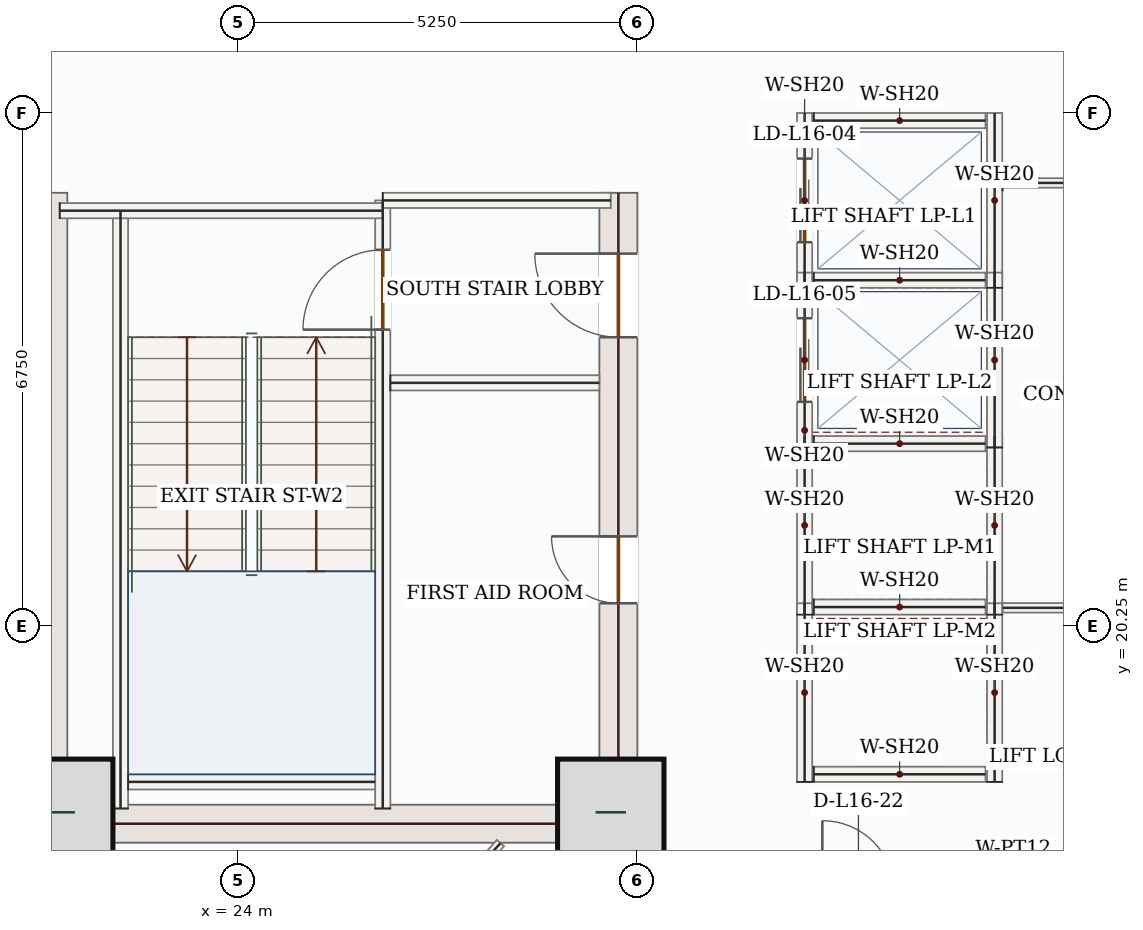
"""IFC4 building model, lengths in metres.
Left out: names, types, materials, properties, quantities, classifications, styles, units other than length and angle.
Written with IfcOpenShell. Run it as: python <this file> out.ifc"""

import sys

from ifc_helpers import new_model, si_unit, direction, frame, frame_2d, origin, origin_2d, place, context, subcontext, project, spatial, rectangle, extrude, source, transform, mapped, element, fill, save


model = new_model("IFC4")
c1 = context("Model", 3, precision=1e-05, world=origin(), true_north=direction((0.0, 1.0)))
c2 = subcontext(c1, "Body", "Model", "MODEL_VIEW")
j1 = project(units=[si_unit("LENGTHUNIT", "METRE"), si_unit("PLANEANGLEUNIT", "RADIAN")], contexts=[c1])
p1 = place(None, origin())
s1 = spatial("IfcSite", under=j1, at=p1, CompositionType="ELEMENT")
p2 = place(p1, origin())
s2 = spatial("IfcBuilding", under=s1, at=p2, CompositionType="ELEMENT")
p3 = place(p2, frame((0.0, 0.0, 75.3)))
s3 = spatial("IfcBuildingStorey", under=s2, at=p3, CompositionType="ELEMENT", Elevation=75.3)
m1 = source(origin(), c2, "Body", "SweptSolid", [
    extrude(rectangle(XDim=8.55, YDim=0.5, at=frame_2d((4.275, 0.0))), origin(), (0.0, 0.0, 1.0), 3.95),
])
p4 = place(p3, frame((21.5, 17.4, 0.0), z_axis=(0.0, 0.0, 1.0), x_axis=(0.0, 1.0, 0.0)))
e1 = element("IfcWall", 1, at=p4, inside=s3, PredefinedType="SHEAR", context=c2, shape_type="MappedRepresentation", body=[
    mapped(m1, transform((0.0, 0.0, 0.0), x_axis=(1.0, 0.0, 0.0), y_axis=(0.0, 1.0, 0.0), z_axis=(0.0, 0.0, 1.0), scale=1.0)),
])
p5 = place(p3, frame((29.0, 17.4, 0.0), z_axis=(0.0, 0.0, 1.0), x_axis=(0.0, 1.0, 0.0)))
e2 = element("IfcWall", 2, at=p5, inside=s3, PredefinedType="SHEAR", context=c2, shape_type="SweptSolid", body=[
    extrude(rectangle(XDim=8.55, YDim=0.5, at=frame_2d((4.275, 0.0))), origin(), (0.0, 0.0, 1.0), 3.95),
])
p6 = place(p5, frame((6.65, 0.0, 0.0)))
e3 = element("IfcOpeningElement", 3, at=p6, cuts=e2, PredefinedType="OPENING", context=c2, shape_type="SweptSolid", body=[
    extrude(rectangle(XDim=1.1, YDim=2.2, at=frame_2d((0.55, 1.1))), frame((0.0, 0.26, 0.0), z_axis=(0.0, -1.0, 0.0), x_axis=(1.0, 0.0, 0.0)), (0.0, 0.0, 1.0), 0.52),
])
p7 = place(p5, frame((3.15, 0.0, 0.0)))
e4 = element("IfcOpeningElement", 4, at=p7, cuts=e2, PredefinedType="OPENING", context=c2, shape_type="SweptSolid", body=[
    extrude(rectangle(XDim=0.88, YDim=2.1, at=frame_2d((0.44, 1.05))), frame((0.0, 0.26, 0.0), z_axis=(0.0, -1.0, 0.0), x_axis=(1.0, 0.0, 0.0)), (0.0, 0.0, 1.0), 0.52),
])
m2 = source(origin(), c2, "Body", "SweptSolid", [
    extrude(rectangle(XDim=7.0, YDim=0.5, at=frame_2d((3.5, 0.0))), origin(), (0.0, 0.0, 1.0), 3.95),
])
p8 = place(p3, frame((21.75, 17.65, 0.0), z_axis=(0.0, 0.0, 1.0), x_axis=(1.0, 0.0, 0.0)))
e5 = element("IfcWall", 5, at=p8, inside=s3, PredefinedType="SHEAR", context=c2, shape_type="MappedRepresentation", body=[
    mapped(m2, transform((0.0, 0.0, 0.0), x_axis=(1.0, 0.0, 0.0), y_axis=(0.0, 1.0, 0.0), z_axis=(0.0, 0.0, 1.0), scale=1.0)),
])
m3 = source(origin(), c2, "Body", "SweptSolid", [
    extrude(rectangle(XDim=1.4, YDim=1.4, at=origin_2d()), origin(), (0.0, 0.0, 1.0), 4.2),
])
for number, where, z_axis, x_axis in (
    (6, (21.65, 17.8, 0.0), (0.0, 0.0, 1.0), (1.0, 0.0, 0.0)),
    (7, (28.9, 17.8, 0.0), (0.0, 0.0, 1.0), (1.0, 0.0, 0.0)),
):
    element("IfcColumn", number, at=place(p3, frame(where, z_axis=z_axis, x_axis=x_axis)), inside=s3, PredefinedType="COLUMN", context=c2, shape_type="MappedRepresentation", body=[
        mapped(m3, transform((0.0, 0.0, 0.0), x_axis=(1.0, 0.0, 0.0), y_axis=(0.0, 1.0, 0.0), z_axis=(0.0, 0.0, 1.0), scale=1.0)),
    ])
p9 = place(p3, frame((22.658, 14.74, 0.0), z_axis=(0.0, 0.0, 1.0), x_axis=(-0.707106781187, 0.707106781187, 0.0)))
e8 = element("IfcWall", 8, at=p9, inside=s3, PredefinedType="SOLIDWALL", context=c2, shape_type="SweptSolid", body=[
    extrude(rectangle(XDim=5.258, YDim=0.32, at=frame_2d((2.629, 0.0))), origin(), (0.0, 0.0, 1.0), 3.95),
])
p10 = place(p9, frame((1.429, 0.0, 0.85)))
e9 = element("IfcOpeningElement", 9, at=p10, cuts=e8, PredefinedType="OPENING", context=c2, shape_type="SweptSolid", body=[
    extrude(rectangle(XDim=2.4, YDim=1.8, at=frame_2d((1.2, 0.9))), frame((0.0, 0.17, 0.0), z_axis=(0.0, -1.0, 0.0), x_axis=(1.0, 0.0, 0.0)), (0.0, 0.0, 1.0), 0.34),
])
m4 = source(origin(), c2, "Body", "SweptSolid", [
    extrude(rectangle(XDim=7.87, YDim=0.2, at=frame_2d((3.935, 0.0))), origin(), (0.0, 0.0, 1.0), 3.95),
])
p11 = place(p3, frame((22.45, 17.85, 0.0), z_axis=(0.0, 0.0, 1.0), x_axis=(0.0, 1.0, 0.0)))
e10 = element("IfcWall", 10, at=p11, inside=s3, PredefinedType="SOLIDWALL", context=c2, shape_type="MappedRepresentation", body=[
    mapped(m4, transform((0.0, 0.0, 0.0), x_axis=(1.0, 0.0, 0.0), y_axis=(0.0, 1.0, 0.0), z_axis=(0.0, 0.0, 1.0), scale=1.0)),
])
p12 = place(p3, frame((25.9, 17.85, 0.0), z_axis=(0.0, 0.0, 1.0), x_axis=(0.0, 1.0, 0.0)))
e11 = element("IfcWall", 11, at=p12, inside=s3, PredefinedType="SOLIDWALL", context=c2, shape_type="SweptSolid", body=[
    extrude(rectangle(XDim=8.0, YDim=0.2, at=frame_2d((4.0, 0.0))), origin(), (0.0, 0.0, 1.0), 3.95),
])
p13 = place(p12, frame((6.3, 0.0, 0.0)))
e12 = element("IfcOpeningElement", 12, at=p13, cuts=e11, PredefinedType="OPENING", context=c2, shape_type="SweptSolid", body=[
    extrude(rectangle(XDim=1.05, YDim=2.15, at=frame_2d((0.525, 1.075))), frame((0.0, 0.11, 0.0), z_axis=(0.0, -1.0, 0.0), x_axis=(1.0, 0.0, 0.0)), (0.0, 0.0, 1.0), 0.22),
])
m5 = source(origin(), c2, "Body", "SweptSolid", [
    extrude(rectangle(XDim=4.25, YDim=0.2, at=frame_2d((2.125, 0.0))), origin(), (0.0, 0.0, 1.0), 3.95),
])
p14 = place(p3, frame((21.65, 25.715, 0.0), z_axis=(0.0, 0.0, 1.0), x_axis=(1.0, 0.0, 0.0)))
e13 = element("IfcWall", 13, at=p14, inside=s3, PredefinedType="SOLIDWALL", context=c2, shape_type="MappedRepresentation", body=[
    mapped(m5, transform((0.0, 0.0, 0.0), x_axis=(1.0, 0.0, 0.0), y_axis=(0.0, 1.0, 0.0), z_axis=(0.0, 0.0, 1.0), scale=1.0)),
])
m6 = source(origin(), c2, "Body", "SweptSolid", [
    extrude(rectangle(XDim=3.0, YDim=0.2, at=frame_2d((1.5, 0.0))), origin(), (0.0, 0.0, 1.0), 3.95),
])
p15 = place(p3, frame((25.9, 25.85, 0.0), z_axis=(0.0, 0.0, 1.0), x_axis=(1.0, 0.0, 0.0)))
e14 = element("IfcWall", 14, at=p15, inside=s3, PredefinedType="SOLIDWALL", context=c2, shape_type="MappedRepresentation", body=[
    mapped(m6, transform((0.0, 0.0, 0.0), x_axis=(1.0, 0.0, 0.0), y_axis=(0.0, 1.0, 0.0), z_axis=(0.0, 0.0, 1.0), scale=1.0)),
])
m7 = source(origin(), c2, "Body", "SweptSolid", [
    extrude(rectangle(XDim=3.25, YDim=0.2, at=frame_2d((1.625, 0.0))), origin(), (0.0, 0.0, 1.0), 3.95),
])
p16 = place(p3, frame((22.55, 18.2, 0.0), z_axis=(0.0, 0.0, 1.0), x_axis=(1.0, 0.0, 0.0)))
e15 = element("IfcWall", 15, at=p16, inside=s3, PredefinedType="SOLIDWALL", context=c2, shape_type="MappedRepresentation", body=[
    mapped(m7, transform((0.0, 0.0, 0.0), x_axis=(1.0, 0.0, 0.0), y_axis=(0.0, 1.0, 0.0), z_axis=(0.0, 0.0, 1.0), scale=1.0)),
])
m8 = source(origin(), c2, "Body", "SweptSolid", [
    extrude(rectangle(XDim=2.75, YDim=0.2, at=frame_2d((1.375, 0.0))), origin(), (0.0, 0.0, 1.0), 3.95),
])
p17 = place(p3, frame((26.0, 23.45, 0.0), z_axis=(0.0, 0.0, 1.0), x_axis=(1.0, 0.0, 0.0)))
e16 = element("IfcWall", 16, at=p17, inside=s3, PredefinedType="SOLIDWALL", context=c2, shape_type="MappedRepresentation", body=[
    mapped(m8, transform((0.0, 0.0, 0.0), x_axis=(1.0, 0.0, 0.0), y_axis=(0.0, 1.0, 0.0), z_axis=(0.0, 0.0, 1.0), scale=1.0)),
])
m9 = source(origin(), c2, "Body", "SweptSolid", [
    extrude(rectangle(XDim=2.35, YDim=0.2, at=frame_2d((1.175, 0.0))), origin(), (0.0, 0.0, 1.0), 3.95),
])
for number, where, z_axis, x_axis in (
    (17, (31.45, 20.4, 0.0), (0.0, 0.0, 1.0), (0.0, 1.0, 0.0)),
    (18, (33.95, 20.4, 0.0), (0.0, 0.0, 1.0), (0.0, 1.0, 0.0)),
):
    element("IfcWall", number, at=place(p3, frame(where, z_axis=z_axis, x_axis=x_axis)), inside=s3, PredefinedType="SOLIDWALL", context=c2, shape_type="MappedRepresentation", body=[
        mapped(m9, transform((0.0, 0.0, 0.0), x_axis=(1.0, 0.0, 0.0), y_axis=(0.0, 1.0, 0.0), z_axis=(0.0, 0.0, 1.0), scale=1.0)),
    ])
m10 = source(origin(), c2, "Body", "SweptSolid", [
    extrude(rectangle(XDim=2.26, YDim=0.2, at=frame_2d((1.13, 0.0))), origin(), (0.0, 0.0, 1.0), 3.95),
])
for number, where, z_axis, x_axis in (
    (19, (31.57, 20.5, 0.0), (0.0, 0.0, 1.0), (1.0, 0.0, 0.0)),
    (20, (31.57, 22.65, 0.0), (0.0, 0.0, 1.0), (1.0, 0.0, 0.0)),
):
    element("IfcWall", number, at=place(p3, frame(where, z_axis=z_axis, x_axis=x_axis)), inside=s3, PredefinedType="SOLIDWALL", context=c2, shape_type="MappedRepresentation", body=[
        mapped(m10, transform((0.0, 0.0, 0.0), x_axis=(1.0, 0.0, 0.0), y_axis=(0.0, 1.0, 0.0), z_axis=(0.0, 0.0, 1.0), scale=1.0)),
    ])
for number, where, z_axis, x_axis in (
    (21, (31.45, 18.2, 0.0), (0.0, 0.0, 1.0), (0.0, 1.0, 0.0)),
    (22, (33.95, 18.2, 0.0), (0.0, 0.0, 1.0), (0.0, 1.0, 0.0)),
):
    element("IfcWall", number, at=place(p3, frame(where, z_axis=z_axis, x_axis=x_axis)), inside=s3, PredefinedType="SOLIDWALL", context=c2, shape_type="MappedRepresentation", body=[
        mapped(m9, transform((0.0, 0.0, 0.0), x_axis=(1.0, 0.0, 0.0), y_axis=(0.0, 1.0, 0.0), z_axis=(0.0, 0.0, 1.0), scale=1.0)),
    ])
p18 = place(p3, frame((31.57, 18.3, 0.0), z_axis=(0.0, 0.0, 1.0), x_axis=(1.0, 0.0, 0.0)))
e23 = element("IfcWall", 23, at=p18, inside=s3, PredefinedType="SOLIDWALL", context=c2, shape_type="MappedRepresentation", body=[
    mapped(m10, transform((0.0, 0.0, 0.0), x_axis=(1.0, 0.0, 0.0), y_axis=(0.0, 1.0, 0.0), z_axis=(0.0, 0.0, 1.0), scale=1.0)),
])
p19 = place(p3, frame((31.45, 24.7, 0.0), z_axis=(0.0, 0.0, 1.0), x_axis=(0.0, 1.0, 0.0)))
e24 = element("IfcWall", 24, at=p19, inside=s3, PredefinedType="SOLIDWALL", context=c2, shape_type="SweptSolid", body=[
    extrude(rectangle(XDim=2.3, YDim=0.2, at=frame_2d((1.15, 0.0))), origin(), (0.0, 0.0, 1.0), 3.95),
])
p20 = place(p19, frame((0.6, 0.0, 0.0)))
e25 = element("IfcOpeningElement", 25, at=p20, cuts=e24, PredefinedType="OPENING", context=c2, shape_type="SweptSolid", body=[
    extrude(rectangle(XDim=1.1, YDim=2.15, at=frame_2d((0.55, 1.075))), frame((0.0, 0.11, 0.0), z_axis=(0.0, -1.0, 0.0), x_axis=(1.0, 0.0, 0.0)), (0.0, 0.0, 1.0), 0.22),
])
m11 = source(origin(), c2, "Body", "SweptSolid", [
    extrude(rectangle(XDim=2.3, YDim=0.2, at=frame_2d((1.15, 0.0))), origin(), (0.0, 0.0, 1.0), 3.95),
])
p21 = place(p3, frame((33.95, 24.7, 0.0), z_axis=(0.0, 0.0, 1.0), x_axis=(0.0, 1.0, 0.0)))
e26 = element("IfcWall", 26, at=p21, inside=s3, PredefinedType="SOLIDWALL", context=c2, shape_type="MappedRepresentation", body=[
    mapped(m11, transform((0.0, 0.0, 0.0), x_axis=(1.0, 0.0, 0.0), y_axis=(0.0, 1.0, 0.0), z_axis=(0.0, 0.0, 1.0), scale=1.0)),
])
for number, where, z_axis, x_axis in (
    (27, (31.57, 24.8, 0.0), (0.0, 0.0, 1.0), (1.0, 0.0, 0.0)),
    (28, (31.57, 26.9, 0.0), (0.0, 0.0, 1.0), (1.0, 0.0, 0.0)),
):
    element("IfcWall", number, at=place(p3, frame(where, z_axis=z_axis, x_axis=x_axis)), inside=s3, PredefinedType="SOLIDWALL", context=c2, shape_type="MappedRepresentation", body=[
        mapped(m10, transform((0.0, 0.0, 0.0), x_axis=(1.0, 0.0, 0.0), y_axis=(0.0, 1.0, 0.0), z_axis=(0.0, 0.0, 1.0), scale=1.0)),
    ])
p22 = place(p3, frame((31.45, 22.6, 0.0), z_axis=(0.0, 0.0, 1.0), x_axis=(0.0, 1.0, 0.0)))
e29 = element("IfcWall", 29, at=p22, inside=s3, PredefinedType="SOLIDWALL", context=c2, shape_type="SweptSolid", body=[
    extrude(rectangle(XDim=2.3, YDim=0.2, at=frame_2d((1.15, 0.0))), origin(), (0.0, 0.0, 1.0), 3.95),
])
p23 = place(p22, frame((0.6, 0.0, 0.0)))
e30 = element("IfcOpeningElement", 30, at=p23, cuts=e29, PredefinedType="OPENING", context=c2, shape_type="SweptSolid", body=[
    extrude(rectangle(XDim=1.1, YDim=2.15, at=frame_2d((0.55, 1.075))), frame((0.0, 0.11, 0.0), z_axis=(0.0, -1.0, 0.0), x_axis=(1.0, 0.0, 0.0)), (0.0, 0.0, 1.0), 0.22),
])
m12 = source(origin(), c2, "Body", "SweptSolid", [
    extrude(rectangle(XDim=2.3, YDim=0.2, at=frame_2d((1.15, 0.0))), origin(), (0.0, 0.0, 1.0), 3.95),
])
p24 = place(p3, frame((33.95, 22.6, 0.0), z_axis=(0.0, 0.0, 1.0), x_axis=(0.0, 1.0, 0.0)))
e31 = element("IfcWall", 31, at=p24, inside=s3, PredefinedType="SOLIDWALL", context=c2, shape_type="MappedRepresentation", body=[
    mapped(m12, transform((0.0, 0.0, 0.0), x_axis=(1.0, 0.0, 0.0), y_axis=(0.0, 1.0, 0.0), z_axis=(0.0, 0.0, 1.0), scale=1.0)),
])
p25 = place(p3, frame((34.055, 26.08, 0.0), z_axis=(0.0, 0.0, 1.0), x_axis=(1.0, 0.0, 0.0)))
e32 = element("IfcWall", 32, at=p25, inside=s3, PredefinedType="PARTITIONING", context=c2, shape_type="SweptSolid", body=[
    extrude(rectangle(XDim=3.89, YDim=0.125, at=frame_2d((1.945, 0.0))), origin(), (0.0, 0.0, 1.0), 3.95),
])
p26 = place(p25, frame((1.47, 0.0, 0.0)))
e33 = element("IfcOpeningElement", 33, at=p26, cuts=e32, PredefinedType="OPENING", context=c2, shape_type="SweptSolid", body=[
    extrude(rectangle(XDim=0.95, YDim=2.15, at=frame_2d((0.475, 1.075))), frame((0.0, 0.073, 0.0), z_axis=(0.0, -1.0, 0.0), x_axis=(1.0, 0.0, 0.0)), (0.0, 0.0, 1.0), 0.145),
])
m13 = source(origin(), c2, "Body", "SweptSolid", [
    extrude(rectangle(XDim=3.89, YDim=0.125, at=frame_2d((1.945, 0.0))), origin(), (0.0, 0.0, 1.0), 3.95),
])
p27 = place(p3, frame((37.945, 20.49, 0.0), z_axis=(0.0, 0.0, 1.0), x_axis=(-1.0, 0.0, 0.0)))
e34 = element("IfcWall", 34, at=p27, inside=s3, PredefinedType="PARTITIONING", context=c2, shape_type="MappedRepresentation", body=[
    mapped(m13, transform((0.0, 0.0, 0.0), x_axis=(1.0, 0.0, 0.0), y_axis=(0.0, 1.0, 0.0), z_axis=(0.0, 0.0, 1.0), scale=1.0)),
])
m14 = source(origin(), c2, "Body", "SweptSolid", [
    extrude(rectangle(XDim=3.348, YDim=0.125, at=frame_2d((1.674, 0.0))), origin(), (0.0, 0.0, 1.0), 3.95),
])
p28 = place(p3, frame((25.215, 14.901, 0.0), z_axis=(0.0, 0.0, 1.0), x_axis=(0.667206176518, 0.74487308853, 0.0)))
e35 = element("IfcWall", 35, at=p28, inside=s3, PredefinedType="PARTITIONING", context=c2, shape_type="MappedRepresentation", body=[
    mapped(m14, transform((0.0, 0.0, 0.0), x_axis=(1.0, 0.0, 0.0), y_axis=(0.0, 1.0, 0.0), z_axis=(0.0, 0.0, 1.0), scale=1.0)),
])
m15 = source(origin(), c2, "Body", "SweptSolid", [
    extrude(rectangle(XDim=2.4, YDim=1.8, at=frame_2d((1.2, 0.9))), frame((0.0, 0.03, 0.0), z_axis=(0.0, -1.0, 0.0), x_axis=(1.0, 0.0, 0.0)), (0.0, 0.0, 1.0), 0.06),
])
p29 = place(p10, origin())
e36 = element("IfcWindow", 36, at=p29, inside=s3, PartitioningType="DOUBLE_PANEL_VERTICAL", PredefinedType="WINDOW", context=c2, shape_type="MappedRepresentation", body=[
    mapped(m15, transform((0.0, 0.0, 0.0), x_axis=(1.0, 0.0, 0.0), y_axis=(0.0, 1.0, 0.0), z_axis=(0.0, 0.0, 1.0), scale=1.0)),
])
fill(e9, e36)
m16 = source(origin(), c2, "Body", "SweptSolid", [
    extrude(rectangle(XDim=1.05, YDim=2.15, at=frame_2d((0.525, 1.075))), frame((0.0, 0.025, 0.0), z_axis=(0.0, -1.0, 0.0), x_axis=(1.0, 0.0, 0.0)), (0.0, 0.0, 1.0), 0.05),
])
p30 = place(p13, origin())
e37 = element("IfcDoor", 37, at=p30, inside=s3, OperationType="SINGLE_SWING_LEFT", PredefinedType="DOOR", context=c2, shape_type="MappedRepresentation", body=[
    mapped(m16, transform((0.0, 0.0, 0.0), x_axis=(1.0, 0.0, 0.0), y_axis=(0.0, 1.0, 0.0), z_axis=(0.0, 0.0, 1.0), scale=1.0)),
])
fill(e12, e37)
m17 = source(origin(), c2, "Body", "SweptSolid", [
    extrude(rectangle(XDim=1.1, YDim=2.2, at=frame_2d((0.55, 1.1))), frame((0.0, 0.025, 0.0), z_axis=(0.0, -1.0, 0.0), x_axis=(1.0, 0.0, 0.0)), (0.0, 0.0, 1.0), 0.05),
])
p31 = place(p6, origin())
e38 = element("IfcDoor", 38, at=p31, inside=s3, OperationType="SINGLE_SWING_RIGHT", PredefinedType="DOOR", context=c2, shape_type="MappedRepresentation", body=[
    mapped(m17, transform((0.0, 0.0, 0.0), x_axis=(1.0, 0.0, 0.0), y_axis=(0.0, 1.0, 0.0), z_axis=(0.0, 0.0, 1.0), scale=1.0)),
])
fill(e3, e38)
m18 = source(origin(), c2, "Body", "SweptSolid", [
    extrude(rectangle(XDim=0.88, YDim=2.1, at=frame_2d((0.44, 1.05))), frame((0.0, 0.025, 0.0), z_axis=(0.0, -1.0, 0.0), x_axis=(1.0, 0.0, 0.0)), (0.0, 0.0, 1.0), 0.05),
])
p32 = place(p7, origin())
e39 = element("IfcDoor", 39, at=p32, inside=s3, OperationType="SINGLE_SWING_RIGHT", PredefinedType="DOOR", context=c2, shape_type="MappedRepresentation", body=[
    mapped(m18, transform((0.0, 0.0, 0.0), x_axis=(1.0, 0.0, 0.0), y_axis=(0.0, 1.0, 0.0), z_axis=(0.0, 0.0, 1.0), scale=1.0)),
])
fill(e4, e39)
m19 = source(origin(), c2, "Body", "SweptSolid", [
    extrude(rectangle(XDim=1.1, YDim=2.15, at=frame_2d((0.55, 1.075))), frame((0.0, 0.025, 0.0), z_axis=(0.0, -1.0, 0.0), x_axis=(1.0, 0.0, 0.0)), (0.0, 0.0, 1.0), 0.05),
])
p33 = place(p20, origin())
e40 = element("IfcDoor", 40, at=p33, inside=s3, OperationType="DOUBLE_DOOR_SLIDING", PredefinedType="DOOR", context=c2, shape_type="MappedRepresentation", body=[
    mapped(m19, transform((0.0, 0.0, 0.0), x_axis=(1.0, 0.0, 0.0), y_axis=(0.0, 1.0, 0.0), z_axis=(0.0, 0.0, 1.0), scale=1.0)),
])
fill(e25, e40)
p34 = place(p23, origin())
e41 = element("IfcDoor", 41, at=p34, inside=s3, OperationType="DOUBLE_DOOR_SLIDING", PredefinedType="DOOR", context=c2, shape_type="MappedRepresentation", body=[
    mapped(m19, transform((0.0, 0.0, 0.0), x_axis=(1.0, 0.0, 0.0), y_axis=(0.0, 1.0, 0.0), z_axis=(0.0, 0.0, 1.0), scale=1.0)),
])
fill(e30, e41)
save(model, sys.argv[1])
